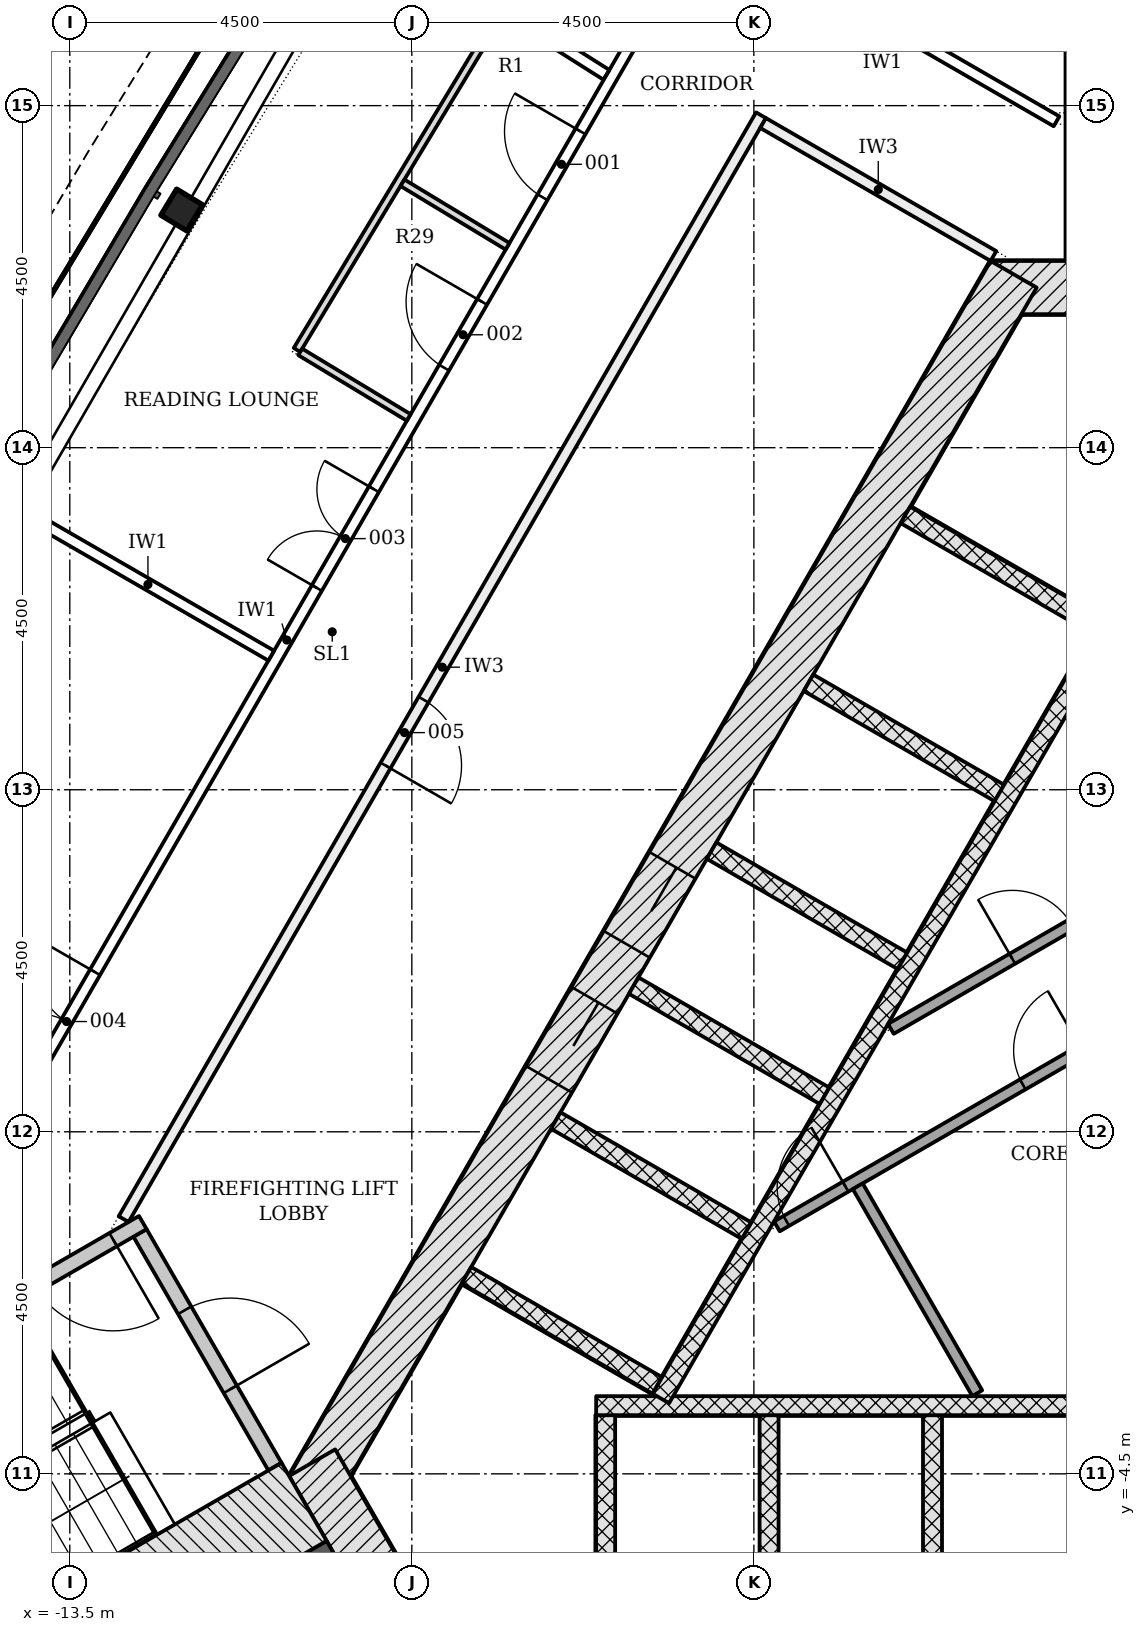
"""IFC4 building model, lengths in metres.
Left out: names, types, materials, properties, quantities, classifications, styles, units other than length and angle.
Written with IfcOpenShell. Run it as: python <this file> out.ifc"""

import sys

from ifc_helpers import new_model, si_unit, direction, frame, frame_2d, origin, origin_2d, place, context, subcontext, project, spatial, polyline, rectangle, i_section, outline, extrude, element, fill, save


model = new_model("IFC4")
c1 = context("Model", 3, precision=1e-05, world=origin(), true_north=direction((0.0, 1.0)))
c2 = subcontext(c1, "Body", "Model", "MODEL_VIEW")
j1 = project(units=[si_unit("LENGTHUNIT", "METRE"), si_unit("PLANEANGLEUNIT", "RADIAN")], contexts=[c1])
p1 = place(None, origin())
s1 = spatial("IfcSite", under=j1, at=p1, CompositionType="ELEMENT")
p2 = place(p1, origin())
s2 = spatial("IfcBuilding", under=s1, at=p2, CompositionType="ELEMENT")
p3 = place(p2, frame((0.0, 0.0, 105.9)))
s3 = spatial("IfcBuildingStorey", under=s2, at=p3, CompositionType="ELEMENT", Elevation=105.9)
p4 = place(p3, frame((1.386, 11.106, -0.2), z_axis=(0.0, 0.0, 1.0), x_axis=(-1.0, 0.0, 0.0)))
e1 = element("IfcWall", 1, at=p4, inside=s3, PredefinedType="SHEAR", context=c2, shape_type="SweptSolid", body=[
    extrude(rectangle(XDim=2.771, YDim=0.7, at=frame_2d((1.386, 0.0))), origin(), (0.0, 0.0, 1.0), 3.6),
])
p5 = place(p3, frame((-1.083, 11.281, -0.2), z_axis=(0.0, 0.0, 1.0), x_axis=(-0.500001446645, -0.866024568562, 0.0)))
e2 = element("IfcWall", 2, at=p5, inside=s3, PredefinedType="SHEAR", context=c2, shape_type="SweptSolid", body=[
    extrude(rectangle(XDim=18.458, YDim=0.7, at=frame_2d((9.229, 0.0))), origin(), (0.0, 0.0, 1.0), 3.6),
])
p6 = place(p5, frame((8.979, 0.0, 0.2)))
e3 = element("IfcOpeningElement", 3, at=p6, cuts=e2, PredefinedType="OPENING", context=c2, shape_type="SweptSolid", body=[
    extrude(rectangle(XDim=1.2, YDim=2.1, at=frame_2d((0.6, 1.05))), frame((0.0, 0.36, 0.0), z_axis=(0.0, -1.0, 0.0), x_axis=(1.0, 0.0, 0.0)), (0.0, 0.0, 1.0), 0.72),
])
p7 = place(p5, frame((11.029, 0.0, 0.2)))
e4 = element("IfcOpeningElement", 4, at=p7, cuts=e2, PredefinedType="OPENING", context=c2, shape_type="SweptSolid", body=[
    extrude(rectangle(XDim=1.2, YDim=2.1, at=frame_2d((0.6, 1.05))), frame((0.0, 0.36, 0.0), z_axis=(0.0, -1.0, 0.0), x_axis=(1.0, 0.0, 0.0)), (0.0, 0.0, 1.0), 0.72),
])
p8 = place(p3, frame((-10.311, -4.353, -0.2), z_axis=(0.0, 0.0, 1.0), x_axis=(0.500042739161, -0.866000726912, 0.0)))
e5 = element("IfcWall", 5, at=p8, inside=s3, PredefinedType="SHEAR", context=c2, shape_type="SweptSolid", body=[
    extrude(rectangle(XDim=2.771, YDim=0.7, at=frame_2d((1.386, 0.0))), origin(), (0.0, 0.0, 1.0), 3.6),
])
p9 = place(p3, frame((0.0, 11.456, -0.2), z_axis=(0.0, 0.0, 1.0), x_axis=(0.0, 1.0, 0.0)))
e6 = element("IfcWall", 6, at=p9, inside=s3, PredefinedType="SHEAR", context=c2, shape_type="SweptSolid", body=[
    extrude(rectangle(XDim=11.919, YDim=0.8, at=frame_2d((5.959, 0.0))), origin(), (0.0, 0.0, 1.0), 3.6),
])
p10 = place(p3, frame((-9.922, -5.728, -0.2), z_axis=(0.0, 0.0, 1.0), x_axis=(-0.866027307971, -0.499996701837, 0.0)))
e7 = element("IfcWall", 7, at=p10, inside=s3, PredefinedType="SHEAR", context=c2, shape_type="SweptSolid", body=[
    extrude(rectangle(XDim=11.918, YDim=0.8, at=frame_2d((5.959, 0.0))), origin(), (0.0, 0.0, 1.0), 3.6),
])
p11 = place(p3, frame((-12.027, 12.127, -0.2), z_axis=(0.0, 0.0, 1.0), x_axis=(-0.517286763685, -0.855812131321, 0.0)))
e8 = element("IfcColumn", 8, at=p11, inside=s3, PredefinedType="COLUMN", context=c2, shape_type="SweptSolid", body=[
    extrude(i_section(OverallWidth=0.401, OverallDepth=0.399, WebThickness=0.025, FlangeThickness=0.04, FilletRadius=0.015, at=origin_2d()), origin(), (0.0, 0.0, 1.0), 3.6),
])
p12 = place(p3, origin())
e9 = element("IfcWall", 9, at=p12, inside=s3, PredefinedType="PARAPET", context=c2, shape_type="SweptSolid", body=[
    extrude(outline(polyline([(-3.375, 26.953), (-5.966, 28.358), (-8.687, 29.371), (-11.446, 29.958), (-14.148, 30.099), (-16.702, 29.789), (-19.02, 29.039), (-21.024, 27.873), (-22.646, 26.333), (-23.83, 24.469), (-24.536, 22.347), (-24.74, 20.038), (-24.435, 17.62), (-23.631, 15.176), (-22.356, 12.79), (-20.653, 10.542), (-18.58, 8.509), (-16.208, 6.76), (-16.06, 6.961), (-18.418, 8.699), (-20.465, 10.707), (-22.145, 12.925), (-23.4, 15.275), (-24.19, 17.675), (-24.489, 20.042), (-24.29, 22.296), (-23.603, 24.362), (-22.452, 26.173), (-20.873, 27.672), (-18.918, 28.809), (-16.647, 29.544), (-14.139, 29.848), (-11.478, 29.709), (-8.757, 29.13), (-6.07, 28.129), (-3.495, 26.733), (-3.375, 26.953)])), origin(), (0.0, 0.0, 1.0), 1.1),
])
for number, where, z_axis, x_axis in (
    (10, (-6.45, -6.228, -0.2), (0.0, 0.0, 1.0), (0.0, 1.0, 0.0)),
    (11, (-4.3, -6.228, -0.2), (0.0, 0.0, 1.0), (0.0, 1.0, 0.0)),
    (12, (-2.15, -6.228, -0.2), (0.0, 0.0, 1.0), (0.0, 1.0, 0.0)),
):
    element("IfcWall", number, at=place(p3, frame(where, z_axis=z_axis, x_axis=x_axis)), inside=s3, PredefinedType="PARTITIONING", context=c2, shape_type="SweptSolid", body=[
        extrude(rectangle(XDim=2.5, YDim=0.25, at=frame_2d((1.25, 0.0))), origin(), (0.0, 0.0, 1.0), 3.6),
    ])
p13 = place(p3, frame((-6.575, -3.603, 0.0), z_axis=(0.0, 0.0, 1.0), x_axis=(1.0, 0.0, 0.0)))
e13 = element("IfcWall", 13, at=p13, inside=s3, PredefinedType="PARTITIONING", context=c2, shape_type="SweptSolid", body=[
    extrude(rectangle(XDim=13.15, YDim=0.25, at=frame_2d((6.575, 0.0))), origin(), (0.0, 0.0, 1.0), 3.4),
])
p14 = place(p3, frame((-2.506, 8.115, -0.2), z_axis=(0.0, 0.0, 1.0), x_axis=(0.865996321171, -0.50005036918, 0.0)))
e14 = element("IfcWall", 14, at=p14, inside=s3, PredefinedType="PARTITIONING", context=c2, shape_type="SweptSolid", body=[
    extrude(rectangle(XDim=2.9, YDim=0.25, at=frame_2d((1.45, 0.0))), origin(), (0.0, 0.0, 1.0), 3.6),
])
for number, where, z_axis, x_axis in (
    (15, (-3.781, 5.907, -0.2), (0.0, 0.0, 1.0), (0.866, -0.5, 0.0)),
    (16, (-5.056, 3.699, -0.2), (0.0, 0.0, 1.0), (0.866, -0.5, 0.0)),
    (17, (-6.081, 1.923, -0.2), (0.0, 0.0, 1.0), (0.866, -0.5, 0.0)),
    (18, (-7.106, 0.148, -0.2), (0.0, 0.0, 1.0), (0.866, -0.5, 0.0)),
    (19, (-8.281, -1.887, -0.2), (0.0, 0.0, 1.0), (0.866, -0.5, 0.0)),
):
    element("IfcWall", number, at=place(p3, frame(where, z_axis=z_axis, x_axis=x_axis)), inside=s3, PredefinedType="PARTITIONING", context=c2, shape_type="SweptSolid", body=[
        extrude(rectangle(XDim=2.9, YDim=0.25, at=frame_2d((1.45, 0.0))), origin(), (0.0, 0.0, 1.0), 3.6),
    ])
p15 = place(p3, frame((0.176, 6.711, 0.0), z_axis=(0.0, 0.0, 1.0), x_axis=(-0.500004227369, -0.866022963098, 0.0)))
e20 = element("IfcWall", 20, at=p15, inside=s3, PredefinedType="PARTITIONING", context=c2, shape_type="SweptSolid", body=[
    extrude(rectangle(XDim=11.8, YDim=0.25, at=frame_2d((5.9, 0.0))), origin(), (0.0, 0.0, 1.0), 3.4),
])
p16 = place(p3, frame((-4.198, -1.244, 0.0), z_axis=(0.0, 0.0, 1.0), x_axis=(0.866020798945, 0.500007975732, 0.0)))
e21 = element("IfcWall", 21, at=p16, inside=s3, PredefinedType="PARTITIONING", context=c2, shape_type="SweptSolid", body=[
    extrude(rectangle(XDim=10.486, YDim=0.15, at=frame_2d((5.243, 0.0))), origin(), (0.0, 0.0, 1.0), 3.4),
])
p17 = place(p16, frame((3.736, 0.0, 0.0)))
e22 = element("IfcOpeningElement", 22, at=p17, cuts=e21, PredefinedType="OPENING", context=c2, shape_type="SweptSolid", body=[
    extrude(rectangle(XDim=0.9, YDim=2.1, at=frame_2d((0.45, 1.05))), frame((0.0, 0.085, 0.0), z_axis=(0.0, -1.0, 0.0), x_axis=(1.0, 0.0, 0.0)), (0.0, 0.0, 1.0), 0.17),
])
p18 = place(p16, frame((0.144, 0.0, 0.0)))
e23 = element("IfcOpeningElement", 23, at=p18, cuts=e21, PredefinedType="OPENING", context=c2, shape_type="SweptSolid", body=[
    extrude(rectangle(XDim=0.9, YDim=2.1, at=frame_2d((0.45, 1.05))), frame((0.0, 0.085, 0.0), z_axis=(0.0, -1.0, 0.0), x_axis=(1.0, 0.0, 0.0)), (0.0, 0.0, 1.0), 0.17),
])
p19 = place(p3, frame((-1.561, -3.439, 0.0), z_axis=(0.0, 0.0, 1.0), x_axis=(-0.499989077369, 0.866031709877, 0.0)))
e24 = element("IfcWall", 24, at=p19, inside=s3, PredefinedType="PARTITIONING", context=c2, shape_type="SweptSolid", body=[
    extrude(rectangle(XDim=3.144, YDim=0.15, at=frame_2d((1.572, 0.0))), origin(), (0.0, 0.0, 1.0), 3.4),
])
p20 = place(p3, frame((-2.698, 1.354, 0.0), z_axis=(0.0, 0.0, 1.0), x_axis=(0.866021157486, 0.500007354732, 0.0)))
e25 = element("IfcWall", 25, at=p20, inside=s3, PredefinedType="PARTITIONING", context=c2, shape_type="SweptSolid", body=[
    extrude(rectangle(XDim=7.888, YDim=0.15, at=frame_2d((3.944, 0.0))), origin(), (0.0, 0.0, 1.0), 3.4),
])
p21 = place(p20, frame((1.845, 0.0, 0.0)))
e26 = element("IfcOpeningElement", 26, at=p21, cuts=e25, PredefinedType="OPENING", context=c2, shape_type="SweptSolid", body=[
    extrude(rectangle(XDim=0.9, YDim=2.1, at=frame_2d((0.45, 1.05))), frame((0.0, 0.085, 0.0), z_axis=(0.0, -1.0, 0.0), x_axis=(1.0, 0.0, 0.0)), (0.0, 0.0, 1.0), 0.17),
])
p22 = place(p3, frame((-12.576, -1.331, -0.2), z_axis=(0.0, 0.0, 1.0), x_axis=(0.499970499736, -0.8660424351, 0.0)))
e27 = element("IfcWall", 27, at=p22, inside=s3, PredefinedType="SHEAR", context=c2, shape_type="SweptSolid", body=[
    extrude(rectangle(XDim=3.55, YDim=0.2, at=frame_2d((1.775, 0.0))), origin(), (0.0, 0.0, 1.0), 3.6),
])
p23 = place(p22, frame((1.175, 0.0, 0.2)))
e28 = element("IfcOpeningElement", 28, at=p23, cuts=e27, PredefinedType="OPENING", context=c2, shape_type="SweptSolid", body=[
    extrude(rectangle(XDim=1.2, YDim=2.1, at=frame_2d((0.6, 1.05))), frame((0.0, 0.11, 0.0), z_axis=(0.0, -1.0, 0.0), x_axis=(1.0, 0.0, 0.0)), (0.0, 0.0, 1.0), 0.22),
])
p24 = place(p3, frame((-12.539, -1.194, -0.2), z_axis=(0.0, 0.0, 1.0), x_axis=(-0.866045472092, -0.499965239061, 0.0)))
e29 = element("IfcWall", 29, at=p24, inside=s3, PredefinedType="SHEAR", context=c2, shape_type="SweptSolid", body=[
    extrude(rectangle(XDim=5.6, YDim=0.2, at=frame_2d((2.8, 0.0))), origin(), (0.0, 0.0, 1.0), 3.6),
])
p25 = place(p24, frame((0.45, 0.0, 0.2)))
e30 = element("IfcOpeningElement", 30, at=p25, cuts=e29, PredefinedType="OPENING", context=c2, shape_type="SweptSolid", body=[
    extrude(rectangle(XDim=1.2, YDim=2.1, at=frame_2d((0.6, 1.05))), frame((0.0, 0.11, 0.0), z_axis=(0.0, -1.0, 0.0), x_axis=(1.0, 0.0, 0.0)), (0.0, 0.0, 1.0), 0.22),
])
p26 = place(p3, frame((-10.418, -4.868, -0.2), z_axis=(0.0, 0.0, 1.0), x_axis=(-0.866018442252, -0.500012057535, 0.0)))
e31 = element("IfcWall", 31, at=p26, inside=s3, PredefinedType="SHEAR", context=c2, shape_type="SweptSolid", body=[
    extrude(rectangle(XDim=7.2, YDim=1.186, at=frame_2d((3.6, 0.0))), origin(), (0.0, 0.0, 1.0), 3.6),
])
p27 = place(p3, frame((-16.169, -3.099, 0.0), z_axis=(0.0, 0.0, 1.0), x_axis=(0.499999805269, 0.866025516212, 0.0)))
e32 = element("IfcWall", 32, at=p27, inside=s3, PredefinedType="PARTITIONING", context=c2, shape_type="SweptSolid", body=[
    extrude(rectangle(XDim=22.097, YDim=0.15, at=frame_2d((11.049, 0.0))), origin(), (0.0, 0.0, 1.0), 2.847),
])
p28 = place(p27, frame((17.776, 0.0, 0.0)))
e33 = element("IfcOpeningElement", 33, at=p28, cuts=e32, PredefinedType="OPENING", context=c2, shape_type="SweptSolid", body=[
    extrude(rectangle(XDim=1.0, YDim=2.1, at=frame_2d((0.5, 1.05))), frame((0.0, 0.085, 0.0), z_axis=(0.0, -1.0, 0.0), x_axis=(1.0, 0.0, 0.0)), (0.0, 0.0, 1.0), 0.17),
])
p29 = place(p27, frame((15.186, 0.0, 0.0)))
e34 = element("IfcOpeningElement", 34, at=p29, cuts=e32, PredefinedType="OPENING", context=c2, shape_type="SweptSolid", body=[
    extrude(rectangle(XDim=1.0, YDim=2.1, at=frame_2d((0.5, 1.05))), frame((0.0, 0.085, 0.0), z_axis=(0.0, -1.0, 0.0), x_axis=(1.0, 0.0, 0.0)), (0.0, 0.0, 1.0), 0.17),
])
p30 = place(p27, frame((11.84, 0.0, 0.0)))
e35 = element("IfcOpeningElement", 35, at=p30, cuts=e32, PredefinedType="OPENING", context=c2, shape_type="SweptSolid", body=[
    extrude(rectangle(XDim=1.5, YDim=2.1, at=frame_2d((0.75, 1.05))), frame((0.0, 0.085, 0.0), z_axis=(0.0, -1.0, 0.0), x_axis=(1.0, 0.0, 0.0)), (0.0, 0.0, 1.0), 0.17),
])
p31 = place(p27, frame((4.503, 0.0, 0.0)))
e36 = element("IfcOpeningElement", 36, at=p31, cuts=e32, PredefinedType="OPENING", context=c2, shape_type="SweptSolid", body=[
    extrude(rectangle(XDim=1.5, YDim=2.1, at=frame_2d((0.75, 1.05))), frame((0.0, 0.085, 0.0), z_axis=(0.0, -1.0, 0.0), x_axis=(1.0, 0.0, 0.0)), (0.0, 0.0, 1.0), 0.17),
])
p32 = place(p3, frame((-4.407, 13.374, 0.0), z_axis=(0.0, 0.0, 1.0), x_axis=(-0.499997181693, -0.866027030928, 0.0)))
e37 = element("IfcWall", 37, at=p32, inside=s3, PredefinedType="PARTITIONING", context=c2, shape_type="SweptSolid", body=[
    extrude(rectangle(XDim=16.77, YDim=0.15, at=frame_2d((8.385, 0.0))), origin(), (0.0, 0.0, 1.0), 2.847),
])
p33 = place(p32, frame((8.879, 0.0, 0.0)))
e38 = element("IfcOpeningElement", 38, at=p33, cuts=e37, PredefinedType="OPENING", context=c2, shape_type="SweptSolid", body=[
    extrude(rectangle(XDim=1.0, YDim=2.1, at=frame_2d((0.5, 1.05))), frame((0.0, 0.085, 0.0), z_axis=(0.0, -1.0, 0.0), x_axis=(1.0, 0.0, 0.0)), (0.0, 0.0, 1.0), 0.17),
])
p34 = place(p3, frame((-5.093, 15.935, 0.0), z_axis=(0.0, 0.0, 1.0), x_axis=(0.866033195618, -0.499986503906, 0.0)))
e39 = element("IfcWall", 39, at=p34, inside=s3, PredefinedType="PARTITIONING", context=c2, shape_type="SweptSolid", body=[
    extrude(rectangle(XDim=5.282, YDim=0.15, at=frame_2d((2.641, 0.0))), origin(), (0.0, 0.0, 1.0), 3.4),
])
p35 = place(p34, frame((1.816, 0.0, 0.0)))
e40 = element("IfcOpeningElement", 40, at=p35, cuts=e39, PredefinedType="OPENING", context=c2, shape_type="SweptSolid", body=[
    extrude(rectangle(XDim=1.5, YDim=2.1, at=frame_2d((0.75, 1.05))), frame((0.0, 0.085, 0.0), z_axis=(0.0, -1.0, 0.0), x_axis=(1.0, 0.0, 0.0)), (0.0, 0.0, 1.0), 0.17),
])
p36 = place(p3, frame((-4.379, 13.271, 0.0), z_axis=(0.0, 0.0, 1.0), x_axis=(0.866019471182, -0.500010275428, 0.0)))
e41 = element("IfcWall", 41, at=p36, inside=s3, PredefinedType="PARTITIONING", context=c2, shape_type="SweptSolid", body=[
    extrude(rectangle(XDim=3.5, YDim=0.15, at=frame_2d((1.75, 0.0))), origin(), (0.0, 0.0, 1.0), 3.4),
])
p37 = place(p3, frame((-14.094, 8.137, 0.0), z_axis=(0.0, 0.0, 1.0), x_axis=(0.866036909293, -0.499980071345, 0.0)))
e42 = element("IfcWall", 42, at=p37, inside=s3, PredefinedType="PARTITIONING", context=c2, shape_type="SweptSolid", body=[
    extrude(rectangle(XDim=3.746, YDim=0.15, at=frame_2d((1.873, 0.0))), origin(), (0.0, 0.0, 1.0), 2.847),
])
p38 = place(p3, frame((-9.455, 15.812, 0.0), z_axis=(0.0, 0.0, 1.0), x_axis=(0.845256180865, -0.53436129043, 0.0)))
e43 = element("IfcWall", 43, at=p38, inside=s3, PredefinedType="PARTITIONING", context=c2, shape_type="SweptSolid", body=[
    extrude(rectangle(XDim=3.566, YDim=0.15, at=frame_2d((1.783, 0.0))), origin(), (0.0, 0.0, 1.0), 2.847),
])
p39 = place(p3, frame((-7.842, 14.702, 0.0), z_axis=(0.0, 0.0, 1.0), x_axis=(-0.517269453202, -0.855822594224, 0.0)))
e44 = element("IfcWall", 44, at=p39, inside=s3, PredefinedType="PARTITIONING", context=c2, shape_type="SweptSolid", body=[
    extrude(rectangle(XDim=5.16, YDim=0.1, at=frame_2d((2.58, 0.0))), origin(), (0.0, 0.0, 1.0), 2.847),
])
p40 = place(p3, frame((-10.468, 10.26, 0.0), z_axis=(0.0, 0.0, 1.0), x_axis=(0.855795319679, -0.517314576264, 0.0)))
e45 = element("IfcWall", 45, at=p40, inside=s3, PredefinedType="PARTITIONING", context=c2, shape_type="SweptSolid", body=[
    extrude(rectangle(XDim=1.667, YDim=0.1, at=frame_2d((0.833, 0.0))), origin(), (0.0, 0.0, 1.0), 3.4),
])
p41 = place(p3, frame((-9.123, 12.485, 0.0), z_axis=(0.0, 0.0, 1.0), x_axis=(0.855820717892, -0.517272557581, 0.0)))
e46 = element("IfcWall", 46, at=p41, inside=s3, PredefinedType="PARTITIONING", context=c2, shape_type="SweptSolid", body=[
    extrude(rectangle(XDim=1.615, YDim=0.1, at=frame_2d((0.807, 0.0))), origin(), (0.0, 0.0, 1.0), 3.4),
])
p42 = place(p6, origin())
e47 = element("IfcDoor", 47, at=p42, inside=s3, OperationType="DOUBLE_DOOR_SLIDING", PredefinedType="DOOR", context=c2, shape_type="SweptSolid", body=[
    extrude(rectangle(XDim=1.2, YDim=2.1, at=frame_2d((0.6, 1.05))), frame((0.0, 0.025, 0.0), z_axis=(0.0, -1.0, 0.0), x_axis=(1.0, 0.0, 0.0)), (0.0, 0.0, 1.0), 0.05),
])
fill(e3, e47)
p43 = place(p7, origin())
e48 = element("IfcDoor", 48, at=p43, inside=s3, OperationType="DOUBLE_DOOR_SLIDING", PredefinedType="DOOR", context=c2, shape_type="SweptSolid", body=[
    extrude(rectangle(XDim=1.2, YDim=2.1, at=frame_2d((0.6, 1.05))), frame((0.0, 0.025, 0.0), z_axis=(0.0, -1.0, 0.0), x_axis=(1.0, 0.0, 0.0)), (0.0, 0.0, 1.0), 0.05),
])
fill(e4, e48)
p44 = place(p17, origin())
e49 = element("IfcDoor", 49, at=p44, inside=s3, OperationType="SINGLE_SWING_RIGHT", PredefinedType="DOOR", context=c2, shape_type="SweptSolid", body=[
    extrude(rectangle(XDim=0.9, YDim=2.1, at=frame_2d((0.45, 1.05))), frame((0.0, 0.025, 0.0), z_axis=(0.0, -1.0, 0.0), x_axis=(1.0, 0.0, 0.0)), (0.0, 0.0, 1.0), 0.05),
])
fill(e22, e49)
p45 = place(p21, origin())
e50 = element("IfcDoor", 50, at=p45, inside=s3, OperationType="SINGLE_SWING_LEFT", PredefinedType="DOOR", context=c2, shape_type="SweptSolid", body=[
    extrude(rectangle(XDim=0.9, YDim=2.1, at=frame_2d((0.45, 1.05))), frame((0.0, 0.025, 0.0), z_axis=(0.0, -1.0, 0.0), x_axis=(1.0, 0.0, 0.0)), (0.0, 0.0, 1.0), 0.05),
])
fill(e26, e50)
p46 = place(p18, origin())
e51 = element("IfcDoor", 51, at=p46, inside=s3, OperationType="SINGLE_SWING_RIGHT", PredefinedType="DOOR", context=c2, shape_type="SweptSolid", body=[
    extrude(rectangle(XDim=0.9, YDim=2.1, at=frame_2d((0.45, 1.05))), frame((0.0, 0.025, 0.0), z_axis=(0.0, -1.0, 0.0), x_axis=(1.0, 0.0, 0.0)), (0.0, 0.0, 1.0), 0.05),
])
fill(e23, e51)
p47 = place(p23, origin())
e52 = element("IfcDoor", 52, at=p47, inside=s3, OperationType="SINGLE_SWING_RIGHT", PredefinedType="DOOR", context=c2, shape_type="SweptSolid", body=[
    extrude(rectangle(XDim=1.2, YDim=2.1, at=frame_2d((0.6, 1.05))), frame((0.0, 0.025, 0.0), z_axis=(0.0, -1.0, 0.0), x_axis=(1.0, 0.0, 0.0)), (0.0, 0.0, 1.0), 0.05),
])
fill(e28, e52)
p48 = place(p25, origin())
e53 = element("IfcDoor", 53, at=p48, inside=s3, OperationType="SINGLE_SWING_LEFT", PredefinedType="DOOR", context=c2, shape_type="SweptSolid", body=[
    extrude(rectangle(XDim=1.2, YDim=2.1, at=frame_2d((0.6, 1.05))), frame((0.0, 0.025, 0.0), z_axis=(0.0, -1.0, 0.0), x_axis=(1.0, 0.0, 0.0)), (0.0, 0.0, 1.0), 0.05),
])
fill(e30, e53)
p49 = place(p28, origin())
e54 = element("IfcDoor", 54, at=p49, inside=s3, OperationType="SINGLE_SWING_RIGHT", PredefinedType="DOOR", context=c2, shape_type="SweptSolid", body=[
    extrude(rectangle(XDim=1.0, YDim=2.1, at=frame_2d((0.5, 1.05))), frame((0.0, 0.025, 0.0), z_axis=(0.0, -1.0, 0.0), x_axis=(1.0, 0.0, 0.0)), (0.0, 0.0, 1.0), 0.05),
])
fill(e33, e54)
p50 = place(p29, origin())
e55 = element("IfcDoor", 55, at=p50, inside=s3, OperationType="SINGLE_SWING_RIGHT", PredefinedType="DOOR", context=c2, shape_type="SweptSolid", body=[
    extrude(rectangle(XDim=1.0, YDim=2.1, at=frame_2d((0.5, 1.05))), frame((0.0, 0.025, 0.0), z_axis=(0.0, -1.0, 0.0), x_axis=(1.0, 0.0, 0.0)), (0.0, 0.0, 1.0), 0.05),
])
fill(e34, e55)
p51 = place(p30, origin())
e56 = element("IfcDoor", 56, at=p51, inside=s3, OperationType="DOUBLE_DOOR_SINGLE_SWING", PredefinedType="DOOR", context=c2, shape_type="SweptSolid", body=[
    extrude(rectangle(XDim=1.5, YDim=2.1, at=frame_2d((0.75, 1.05))), frame((0.0, 0.025, 0.0), z_axis=(0.0, -1.0, 0.0), x_axis=(1.0, 0.0, 0.0)), (0.0, 0.0, 1.0), 0.05),
])
fill(e35, e56)
p52 = place(p31, origin())
e57 = element("IfcDoor", 57, at=p52, inside=s3, OperationType="DOUBLE_DOOR_SINGLE_SWING", PredefinedType="DOOR", context=c2, shape_type="SweptSolid", body=[
    extrude(rectangle(XDim=1.5, YDim=2.1, at=frame_2d((0.75, 1.05))), frame((0.0, 0.025, 0.0), z_axis=(0.0, -1.0, 0.0), x_axis=(1.0, 0.0, 0.0)), (0.0, 0.0, 1.0), 0.05),
])
fill(e36, e57)
p53 = place(p33, origin())
e58 = element("IfcDoor", 58, at=p53, inside=s3, OperationType="SINGLE_SWING_RIGHT", PredefinedType="DOOR", context=c2, shape_type="SweptSolid", body=[
    extrude(rectangle(XDim=1.0, YDim=2.1, at=frame_2d((0.5, 1.05))), frame((0.0, 0.025, 0.0), z_axis=(0.0, -1.0, 0.0), x_axis=(1.0, 0.0, 0.0)), (0.0, 0.0, 1.0), 0.05),
])
fill(e38, e58)
save(model, sys.argv[1])
